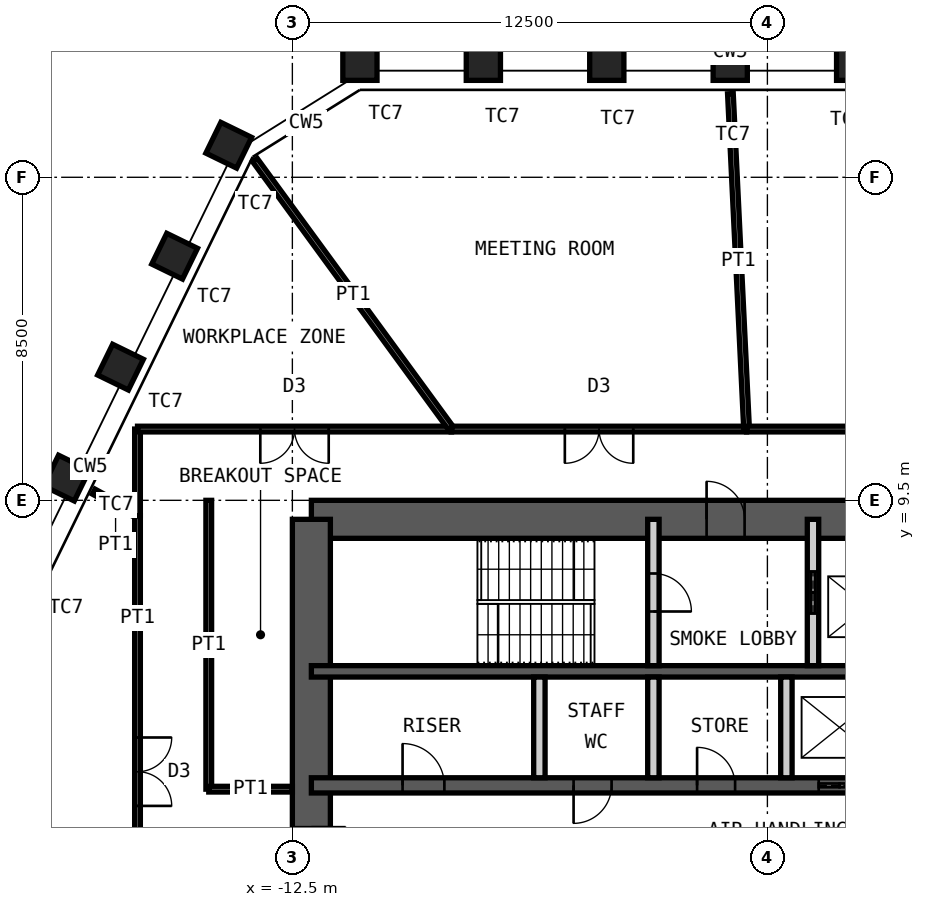
"""IFC4 building model, lengths in metres.
Left out: names, types, materials, properties, quantities, classifications, styles, units other than length and angle.
Written with IfcOpenShell. Run it as: python <this file> out.ifc"""

import sys

from ifc_helpers import new_model, si_unit, direction, frame, frame_2d, origin, origin_2d, place, context, subcontext, project, spatial, rectangle, hollow_rectangle, extrude, element, fill, save


model = new_model("IFC4")
c1 = context("Model", 3, precision=1e-05, world=origin(), true_north=direction((0.0, 1.0)))
c2 = subcontext(c1, "Body", "Model", "MODEL_VIEW")
j1 = project(units=[si_unit("LENGTHUNIT", "METRE"), si_unit("PLANEANGLEUNIT", "RADIAN")], contexts=[c1])
p1 = place(None, origin())
s1 = spatial("IfcSite", under=j1, at=p1, CompositionType="ELEMENT")
p2 = place(p1, origin())
s2 = spatial("IfcBuilding", under=s1, at=p2, CompositionType="ELEMENT")
p3 = place(p2, frame((0.0, 0.0, 291.4)))
s3 = spatial("IfcBuildingStorey", under=s2, at=p3, CompositionType="ELEMENT", Elevation=291.4)
for number, where, z_axis, x_axis in (
    (1, (-10.722, 21.0, 0.0), (0.0, 0.0, 1.0), (-1.0, 0.0, 0.0)),
    (2, (-7.474, 21.0, 0.0), (0.0, 0.0, 1.0), (-1.0, 0.0, 0.0)),
    (3, (-4.226, 21.0, 0.0), (0.0, 0.0, 1.0), (-1.0, 0.0, 0.0)),
    (4, (-0.978, 21.0, 0.0), (0.0, 0.0, 1.0), (-1.0, 0.0, 0.0)),
    (5, (2.27, 21.0, 0.0), (0.0, 0.0, 1.0), (-1.0, 0.0, 0.0)),
    (6, (-18.446, 10.085, 0.0), (0.0, 0.0, 1.0), (-0.438, -0.899, 0.0)),
    (7, (-17.022, 13.004, 0.0), (0.0, 0.0, 1.0), (-0.438, -0.899, 0.0)),
    (8, (-15.598, 15.924, 0.0), (0.0, 0.0, 1.0), (-0.438, -0.899, 0.0)),
    (9, (-14.174, 18.843, 0.0), (0.0, 0.0, 1.0), (-0.438, -0.899, 0.0)),
):
    element("IfcColumn", number, at=place(p3, frame(where, z_axis=z_axis, x_axis=x_axis)), inside=s3, PredefinedType="COLUMN", context=c2, shape_type="SweptSolid", body=[
        extrude(hollow_rectangle(XDim=0.9, YDim=0.9, WallThickness=0.06, at=origin_2d()), origin(), (0.0, 0.0, 1.0), 4.2),
    ])
p4 = place(p3, frame((-12.0, 9.0, 0.0), z_axis=(0.0, 0.0, 1.0), x_axis=(1.0, 0.0, 0.0)))
e10 = element("IfcWall", 10, at=p4, inside=s3, PredefinedType="SHEAR", context=c2, shape_type="SweptSolid", body=[
    extrude(rectangle(XDim=24.0, YDim=1.0, at=frame_2d((12.0, 0.0))), origin(), (0.0, 0.0, 1.0), 4.2),
])
p5 = place(p4, frame((10.4, 0.0, 0.0)))
e11 = element("IfcOpeningElement", 11, at=p5, cuts=e10, PredefinedType="OPENING", context=c2, shape_type="SweptSolid", body=[
    extrude(rectangle(XDim=1.0, YDim=2.1, at=frame_2d((0.5, 1.05))), frame((0.0, 0.51, 0.0), z_axis=(0.0, -1.0, 0.0), x_axis=(1.0, 0.0, 0.0)), (0.0, 0.0, 1.0), 1.02),
])
p6 = place(p4, frame((17.6, 0.0, 0.0)))
e12 = element("IfcOpeningElement", 12, at=p6, cuts=e10, PredefinedType="OPENING", context=c2, shape_type="SweptSolid", body=[
    extrude(rectangle(XDim=0.9, YDim=2.1, at=frame_2d((0.45, 1.05))), frame((0.0, 0.51, 0.0), z_axis=(0.0, -1.0, 0.0), x_axis=(1.0, 0.0, 0.0)), (0.0, 0.0, 1.0), 1.02),
])
p7 = place(p4, frame((21.9, 0.0, 0.0)))
e13 = element("IfcOpeningElement", 13, at=p7, cuts=e10, PredefinedType="OPENING", context=c2, shape_type="SweptSolid", body=[
    extrude(rectangle(XDim=0.9, YDim=2.1, at=frame_2d((0.45, 1.05))), frame((0.0, 0.51, 0.0), z_axis=(0.0, -1.0, 0.0), x_axis=(1.0, 0.0, 0.0)), (0.0, 0.0, 1.0), 1.02),
])
p8 = place(p3, frame((-12.0, -9.0, 0.0), z_axis=(0.0, 0.0, 1.0), x_axis=(0.0, 1.0, 0.0)))
e14 = element("IfcWall", 14, at=p8, inside=s3, PredefinedType="SHEAR", context=c2, shape_type="SweptSolid", body=[
    extrude(rectangle(XDim=18.0, YDim=1.0, at=frame_2d((9.0, 0.0))), origin(), (0.0, 0.0, 1.0), 4.2),
])
p9 = place(p8, frame((8.1, 0.0, 0.0)))
e15 = element("IfcOpeningElement", 15, at=p9, cuts=e14, PredefinedType="OPENING", context=c2, shape_type="SweptSolid", body=[
    extrude(rectangle(XDim=1.8, YDim=2.1, at=frame_2d((0.9, 1.05))), frame((0.0, 0.51, 0.0), z_axis=(0.0, -1.0, 0.0), x_axis=(1.0, 0.0, 0.0)), (0.0, 0.0, 1.0), 1.02),
])
p10 = place(p3, frame((-12.0, 5.0, 0.0), z_axis=(0.0, 0.0, 1.0), x_axis=(1.0, 0.0, 0.0)))
e16 = element("IfcWall", 16, at=p10, inside=s3, PredefinedType="SHEAR", context=c2, shape_type="SweptSolid", body=[
    extrude(rectangle(XDim=24.0, YDim=0.3, at=frame_2d((12.0, 0.0))), origin(), (0.0, 0.0, 1.0), 4.2),
])
p11 = place(p3, frame((-12.0, 2.0, 0.0), z_axis=(0.0, 0.0, 1.0), x_axis=(1.0, 0.0, 0.0)))
e17 = element("IfcWall", 17, at=p11, inside=s3, PredefinedType="SHEAR", context=c2, shape_type="SweptSolid", body=[
    extrude(rectangle(XDim=24.0, YDim=0.4, at=frame_2d((12.0, 0.0))), origin(), (0.0, 0.0, 1.0), 4.2),
])
p12 = place(p11, frame((2.4, 0.0, 0.0)))
e18 = element("IfcOpeningElement", 18, at=p12, cuts=e17, PredefinedType="OPENING", context=c2, shape_type="SweptSolid", body=[
    extrude(rectangle(XDim=1.1, YDim=2.1, at=frame_2d((0.55, 1.05))), frame((0.0, 0.21, 0.0), z_axis=(0.0, -1.0, 0.0), x_axis=(1.0, 0.0, 0.0)), (0.0, 0.0, 1.0), 0.42),
])
p13 = place(p11, frame((22.0, 0.0, 0.0)))
e19 = element("IfcOpeningElement", 19, at=p13, cuts=e17, PredefinedType="OPENING", context=c2, shape_type="SweptSolid", body=[
    extrude(rectangle(XDim=1.1, YDim=2.1, at=frame_2d((0.55, 1.05))), frame((0.0, 0.21, 0.0), z_axis=(0.0, -1.0, 0.0), x_axis=(1.0, 0.0, 0.0)), (0.0, 0.0, 1.0), 0.42),
])
p14 = place(p11, frame((10.15, 0.0, 0.0)))
e20 = element("IfcOpeningElement", 20, at=p14, cuts=e17, PredefinedType="OPENING", context=c2, shape_type="SweptSolid", body=[
    extrude(rectangle(XDim=1.0, YDim=2.1, at=frame_2d((0.5, 1.05))), frame((0.0, 0.21, 0.0), z_axis=(0.0, -1.0, 0.0), x_axis=(1.0, 0.0, 0.0)), (0.0, 0.0, 1.0), 0.42),
])
p15 = place(p11, frame((6.9, 0.0, 0.0)))
e21 = element("IfcOpeningElement", 21, at=p15, cuts=e17, PredefinedType="OPENING", context=c2, shape_type="SweptSolid", body=[
    extrude(rectangle(XDim=1.0, YDim=2.1, at=frame_2d((0.5, 1.05))), frame((0.0, 0.21, 0.0), z_axis=(0.0, -1.0, 0.0), x_axis=(1.0, 0.0, 0.0)), (0.0, 0.0, 1.0), 0.42),
])
p16 = place(p11, frame((13.35, 0.0, 0.0)))
e22 = element("IfcOpeningElement", 22, at=p16, cuts=e17, PredefinedType="OPENING", context=c2, shape_type="SweptSolid", body=[
    extrude(rectangle(XDim=1.1, YDim=2.4, at=frame_2d((0.55, 1.2))), frame((0.0, 0.21, 0.0), z_axis=(0.0, -1.0, 0.0), x_axis=(1.0, 0.0, 0.0)), (0.0, 0.0, 1.0), 0.42),
])
p17 = place(p11, frame((16.15, 0.0, 0.0)))
e23 = element("IfcOpeningElement", 23, at=p17, cuts=e17, PredefinedType="OPENING", context=c2, shape_type="SweptSolid", body=[
    extrude(rectangle(XDim=1.1, YDim=2.4, at=frame_2d((0.55, 1.2))), frame((0.0, 0.21, 0.0), z_axis=(0.0, -1.0, 0.0), x_axis=(1.0, 0.0, 0.0)), (0.0, 0.0, 1.0), 0.42),
])
p18 = place(p11, frame((19.0, 0.0, 0.0)))
e24 = element("IfcOpeningElement", 24, at=p18, cuts=e17, PredefinedType="OPENING", context=c2, shape_type="SweptSolid", body=[
    extrude(rectangle(XDim=1.0, YDim=2.1, at=frame_2d((0.5, 1.05))), frame((0.0, 0.21, 0.0), z_axis=(0.0, -1.0, 0.0), x_axis=(1.0, 0.0, 0.0)), (0.0, 0.0, 1.0), 0.42),
])
p19 = place(p3, frame((-3.0, 5.15, 0.0), z_axis=(0.0, 0.0, 1.0), x_axis=(0.0, 1.0, 0.0)))
e25 = element("IfcWall", 25, at=p19, inside=s3, PredefinedType="PARTITIONING", context=c2, shape_type="SweptSolid", body=[
    extrude(rectangle(XDim=3.85, YDim=0.3, at=frame_2d((1.925, 0.0))), origin(), (0.0, 0.0, 1.0), 3.98),
])
p20 = place(p19, frame((1.425, 0.0, 0.0)))
e26 = element("IfcOpeningElement", 26, at=p20, cuts=e25, PredefinedType="OPENING", context=c2, shape_type="SweptSolid", body=[
    extrude(rectangle(XDim=1.0, YDim=2.1, at=frame_2d((0.5, 1.05))), frame((0.0, 0.16, 0.0), z_axis=(0.0, -1.0, 0.0), x_axis=(1.0, 0.0, 0.0)), (0.0, 0.0, 1.0), 0.32),
])
p21 = place(p3, frame((1.2, 5.15, 0.0), z_axis=(0.0, 0.0, 1.0), x_axis=(0.0, 1.0, 0.0)))
e27 = element("IfcWall", 27, at=p21, inside=s3, PredefinedType="PARTITIONING", context=c2, shape_type="SweptSolid", body=[
    extrude(rectangle(XDim=3.85, YDim=0.3, at=frame_2d((1.925, 0.0))), origin(), (0.0, 0.0, 1.0), 3.98),
])
p22 = place(p21, frame((1.375, 0.0, 0.0)))
e28 = element("IfcOpeningElement", 28, at=p22, cuts=e27, PredefinedType="OPENING", context=c2, shape_type="SweptSolid", body=[
    extrude(rectangle(XDim=1.1, YDim=2.4, at=frame_2d((0.55, 1.2))), frame((0.0, 0.16, 0.0), z_axis=(0.0, -1.0, 0.0), x_axis=(1.0, 0.0, 0.0)), (0.0, 0.0, 1.0), 0.32),
])
for number, where, z_axis, x_axis in (
    (29, (-6.0, 2.2, 0.0), (0.0, 0.0, 1.0), (0.0, 1.0, 0.0)),
    (30, (-3.0, 2.2, 0.0), (0.0, 0.0, 1.0), (0.0, 1.0, 0.0)),
    (31, (0.5, 2.2, 0.0), (0.0, 0.0, 1.0), (0.0, 1.0, 0.0)),
):
    element("IfcWall", number, at=place(p3, frame(where, z_axis=z_axis, x_axis=x_axis)), inside=s3, PredefinedType="PARTITIONING", context=c2, shape_type="SweptSolid", body=[
        extrude(rectangle(XDim=2.65, YDim=0.3, at=frame_2d((1.325, 0.0))), origin(), (0.0, 0.0, 1.0), 3.98),
    ])
p23 = place(p3, frame((-17.729, 9.73, 0.0), z_axis=(0.0, 0.0, 1.0), x_axis=(0.87667364743, -0.481085559855, 0.0)))
e32 = element("IfcWall", 32, at=p23, inside=s3, PredefinedType="PARTITIONING", context=c2, shape_type="SweptSolid", body=[
    extrude(rectangle(XDim=1.316, YDim=0.15, at=frame_2d((0.658, 0.0))), origin(), (0.0, 0.0, 1.0), 3.33),
])
p24 = place(p3, frame((-16.575, 9.097, 0.0), z_axis=(0.0, 0.0, 1.0), x_axis=(0.0, 1.0, 0.0)))
e33 = element("IfcWall", 33, at=p24, inside=s3, PredefinedType="PARTITIONING", context=c2, shape_type="SweptSolid", body=[
    extrude(rectangle(XDim=2.278, YDim=0.15, at=frame_2d((1.139, 0.0))), origin(), (0.0, 0.0, 1.0), 4.03),
])
p25 = place(p3, frame((-16.575, 11.375, 0.0), z_axis=(0.0, 0.0, 1.0), x_axis=(1.0, 0.0, 0.0)))
e34 = element("IfcWall", 34, at=p25, inside=s3, PredefinedType="PARTITIONING", context=c2, shape_type="SweptSolid", body=[
    extrude(rectangle(XDim=8.263, YDim=0.15, at=frame_2d((4.131, 0.0))), origin(), (0.0, 0.0, 1.0), 4.03),
])
p26 = place(p25, frame((3.231, 0.0, 0.0)))
e35 = element("IfcOpeningElement", 35, at=p26, cuts=e34, PredefinedType="OPENING", context=c2, shape_type="SweptSolid", body=[
    extrude(rectangle(XDim=1.8, YDim=2.4, at=frame_2d((0.9, 1.2))), frame((0.0, 0.085, 0.0), z_axis=(0.0, -1.0, 0.0), x_axis=(1.0, 0.0, 0.0)), (0.0, 0.0, 1.0), 0.17),
])
p27 = place(p3, frame((-13.486, 18.455, 0.0), z_axis=(0.0, 0.0, 1.0), x_axis=(0.589997742419, -0.807404894672, 0.0)))
e36 = element("IfcWall", 36, at=p27, inside=s3, PredefinedType="PARTITIONING", context=c2, shape_type="SweptSolid", body=[
    extrude(rectangle(XDim=8.769, YDim=0.15, at=frame_2d((4.385, 0.0))), origin(), (0.0, 0.0, 1.0), 2.93),
])
p28 = place(p3, frame((-8.312, 11.375, 0.0), z_axis=(0.0, 0.0, 1.0), x_axis=(1.0, 0.0, 0.0)))
e37 = element("IfcWall", 37, at=p28, inside=s3, PredefinedType="PARTITIONING", context=c2, shape_type="SweptSolid", body=[
    extrude(rectangle(XDim=7.764, YDim=0.15, at=frame_2d((3.882, 0.0))), origin(), (0.0, 0.0, 1.0), 4.03),
])
p29 = place(p28, frame((2.982, 0.0, 0.0)))
e38 = element("IfcOpeningElement", 38, at=p29, cuts=e37, PredefinedType="OPENING", context=c2, shape_type="SweptSolid", body=[
    extrude(rectangle(XDim=1.8, YDim=2.4, at=frame_2d((0.9, 1.2))), frame((0.0, 0.085, 0.0), z_axis=(0.0, -1.0, 0.0), x_axis=(1.0, 0.0, 0.0)), (0.0, 0.0, 1.0), 0.17),
])
p30 = place(p3, frame((-0.973, 20.2, 0.0), z_axis=(0.0, 0.0, 1.0), x_axis=(0.048134910622, -0.998840843368, 0.0)))
e39 = element("IfcWall", 39, at=p30, inside=s3, PredefinedType="PARTITIONING", context=c2, shape_type="SweptSolid", body=[
    extrude(rectangle(XDim=8.835, YDim=0.15, at=frame_2d((4.418, 0.0))), origin(), (0.0, 0.0, 1.0), 3.33),
])
p31 = place(p3, frame((-0.548, 11.375, 0.0), z_axis=(0.0, 0.0, 1.0), x_axis=(1.0, 0.0, 0.0)))
e40 = element("IfcWall", 40, at=p31, inside=s3, PredefinedType="PARTITIONING", context=c2, shape_type="SweptSolid", body=[
    extrude(rectangle(XDim=13.923, YDim=0.15, at=frame_2d((6.961, 0.0))), origin(), (0.0, 0.0, 1.0), 4.03),
])
p32 = place(p31, frame((6.062, 0.0, 0.0)))
e41 = element("IfcOpeningElement", 41, at=p32, cuts=e40, PredefinedType="OPENING", context=c2, shape_type="SweptSolid", body=[
    extrude(rectangle(XDim=1.8, YDim=2.4, at=frame_2d((0.9, 1.2))), frame((0.0, 0.085, 0.0), z_axis=(0.0, -1.0, 0.0), x_axis=(1.0, 0.0, 0.0)), (0.0, 0.0, 1.0), 0.17),
])
p33 = place(p3, frame((-16.575, -4.377, 0.0), z_axis=(0.0, 0.0, 1.0), x_axis=(0.0, 1.0, 0.0)))
e42 = element("IfcWall", 42, at=p33, inside=s3, PredefinedType="PARTITIONING", context=c2, shape_type="SweptSolid", body=[
    extrude(rectangle(XDim=13.474, YDim=0.15, at=frame_2d((6.737, 0.0))), origin(), (0.0, 0.0, 1.0), 4.03),
])
p34 = place(p33, frame((5.837, 0.0, 0.0)))
e43 = element("IfcOpeningElement", 43, at=p34, cuts=e42, PredefinedType="OPENING", context=c2, shape_type="SweptSolid", body=[
    extrude(rectangle(XDim=1.8, YDim=2.4, at=frame_2d((0.9, 1.2))), frame((0.0, 0.085, 0.0), z_axis=(0.0, -1.0, 0.0), x_axis=(1.0, 0.0, 0.0)), (0.0, 0.0, 1.0), 0.17),
])
p35 = place(p3, frame((-14.7, 1.9, 0.0), z_axis=(0.0, 0.0, 1.0), x_axis=(0.0, 1.0, 0.0)))
e44 = element("IfcWall", 44, at=p35, inside=s3, PredefinedType="PARTITIONING", context=c2, shape_type="SweptSolid", body=[
    extrude(rectangle(XDim=7.6, YDim=0.15, at=frame_2d((3.8, 0.0))), origin(), (0.0, 0.0, 1.0), 4.03),
])
p36 = place(p3, frame((-12.5, 1.9, 0.0), z_axis=(0.0, 0.0, 1.0), x_axis=(-1.0, 0.0, 0.0)))
e45 = element("IfcWall", 45, at=p36, inside=s3, PredefinedType="PARTITIONING", context=c2, shape_type="SweptSolid", body=[
    extrude(rectangle(XDim=2.2, YDim=0.15, at=frame_2d((1.1, 0.0))), origin(), (0.0, 0.0, 1.0), 3.53),
])
p37 = place(p5, origin())
e46 = element("IfcDoor", 46, at=p37, inside=s3, OperationType="SINGLE_SWING_RIGHT", PredefinedType="DOOR", context=c2, shape_type="SweptSolid", body=[
    extrude(rectangle(XDim=1.0, YDim=2.1, at=frame_2d((0.5, 1.05))), frame((0.0, 0.025, 0.0), z_axis=(0.0, -1.0, 0.0), x_axis=(1.0, 0.0, 0.0)), (0.0, 0.0, 1.0), 0.05),
])
fill(e11, e46)
p38 = place(p20, origin())
e47 = element("IfcDoor", 47, at=p38, inside=s3, OperationType="SINGLE_SWING_LEFT", PredefinedType="DOOR", context=c2, shape_type="SweptSolid", body=[
    extrude(rectangle(XDim=1.0, YDim=2.1, at=frame_2d((0.5, 1.05))), frame((0.0, 0.025, 0.0), z_axis=(0.0, -1.0, 0.0), x_axis=(1.0, 0.0, 0.0)), (0.0, 0.0, 1.0), 0.05),
])
fill(e26, e47)
p39 = place(p12, origin())
e48 = element("IfcDoor", 48, at=p39, inside=s3, OperationType="SINGLE_SWING_RIGHT", PredefinedType="DOOR", context=c2, shape_type="SweptSolid", body=[
    extrude(rectangle(XDim=1.1, YDim=2.1, at=frame_2d((0.55, 1.05))), frame((0.0, 0.025, 0.0), z_axis=(0.0, -1.0, 0.0), x_axis=(1.0, 0.0, 0.0)), (0.0, 0.0, 1.0), 0.05),
])
fill(e18, e48)
p40 = place(p14, origin())
e49 = element("IfcDoor", 49, at=p40, inside=s3, OperationType="SINGLE_SWING_RIGHT", PredefinedType="DOOR", context=c2, shape_type="SweptSolid", body=[
    extrude(rectangle(XDim=1.0, YDim=2.1, at=frame_2d((0.5, 1.05))), frame((0.0, 0.025, 0.0), z_axis=(0.0, -1.0, 0.0), x_axis=(1.0, 0.0, 0.0)), (0.0, 0.0, 1.0), 0.05),
])
fill(e20, e49)
p41 = place(p9, origin())
e50 = element("IfcDoor", 50, at=p41, inside=s3, OperationType="DOUBLE_DOOR_DOUBLE_SWING", PredefinedType="DOOR", context=c2, shape_type="SweptSolid", body=[
    extrude(rectangle(XDim=1.8, YDim=2.1, at=frame_2d((0.9, 1.05))), frame((0.0, 0.025, 0.0), z_axis=(0.0, -1.0, 0.0), x_axis=(1.0, 0.0, 0.0)), (0.0, 0.0, 1.0), 0.05),
])
fill(e15, e50)
p42 = place(p22, origin())
e51 = element("IfcDoor", 51, at=p42, inside=s3, OperationType="DOUBLE_DOOR_SLIDING", PredefinedType="DOOR", context=c2, shape_type="SweptSolid", body=[
    extrude(rectangle(XDim=1.1, YDim=2.4, at=frame_2d((0.55, 1.2))), frame((0.0, 0.025, 0.0), z_axis=(0.0, -1.0, 0.0), x_axis=(1.0, 0.0, 0.0)), (0.0, 0.0, 1.0), 0.05),
])
fill(e28, e51)
p43 = place(p15, origin())
e52 = element("IfcDoor", 52, at=p43, inside=s3, OperationType="SINGLE_SWING_LEFT", PredefinedType="DOOR", context=c2, shape_type="SweptSolid", body=[
    extrude(rectangle(XDim=1.0, YDim=2.1, at=frame_2d((0.5, 1.05))), frame((0.0, 0.025, 0.0), z_axis=(0.0, -1.0, 0.0), x_axis=(1.0, 0.0, 0.0)), (0.0, 0.0, 1.0), 0.05),
])
fill(e21, e52)
p44 = place(p16, origin())
e53 = element("IfcDoor", 53, at=p44, inside=s3, OperationType="DOUBLE_DOOR_SLIDING", PredefinedType="DOOR", context=c2, shape_type="SweptSolid", body=[
    extrude(rectangle(XDim=1.1, YDim=2.4, at=frame_2d((0.55, 1.2))), frame((0.0, 0.025, 0.0), z_axis=(0.0, -1.0, 0.0), x_axis=(1.0, 0.0, 0.0)), (0.0, 0.0, 1.0), 0.05),
])
fill(e22, e53)
p45 = place(p26, origin())
e54 = element("IfcDoor", 54, at=p45, inside=s3, OperationType="DOUBLE_DOOR_DOUBLE_SWING", PredefinedType="DOOR", context=c2, shape_type="SweptSolid", body=[
    extrude(rectangle(XDim=1.8, YDim=2.4, at=frame_2d((0.9, 1.2))), frame((0.0, 0.025, 0.0), z_axis=(0.0, -1.0, 0.0), x_axis=(1.0, 0.0, 0.0)), (0.0, 0.0, 1.0), 0.05),
])
fill(e35, e54)
p46 = place(p29, origin())
e55 = element("IfcDoor", 55, at=p46, inside=s3, OperationType="DOUBLE_DOOR_DOUBLE_SWING", PredefinedType="DOOR", context=c2, shape_type="SweptSolid", body=[
    extrude(rectangle(XDim=1.8, YDim=2.4, at=frame_2d((0.9, 1.2))), frame((0.0, 0.025, 0.0), z_axis=(0.0, -1.0, 0.0), x_axis=(1.0, 0.0, 0.0)), (0.0, 0.0, 1.0), 0.05),
])
fill(e38, e55)
p47 = place(p34, origin())
e56 = element("IfcDoor", 56, at=p47, inside=s3, OperationType="DOUBLE_DOOR_DOUBLE_SWING", PredefinedType="DOOR", context=c2, shape_type="SweptSolid", body=[
    extrude(rectangle(XDim=1.8, YDim=2.4, at=frame_2d((0.9, 1.2))), frame((0.0, 0.025, 0.0), z_axis=(0.0, -1.0, 0.0), x_axis=(1.0, 0.0, 0.0)), (0.0, 0.0, 1.0), 0.05),
])
fill(e43, e56)
save(model, sys.argv[1])
